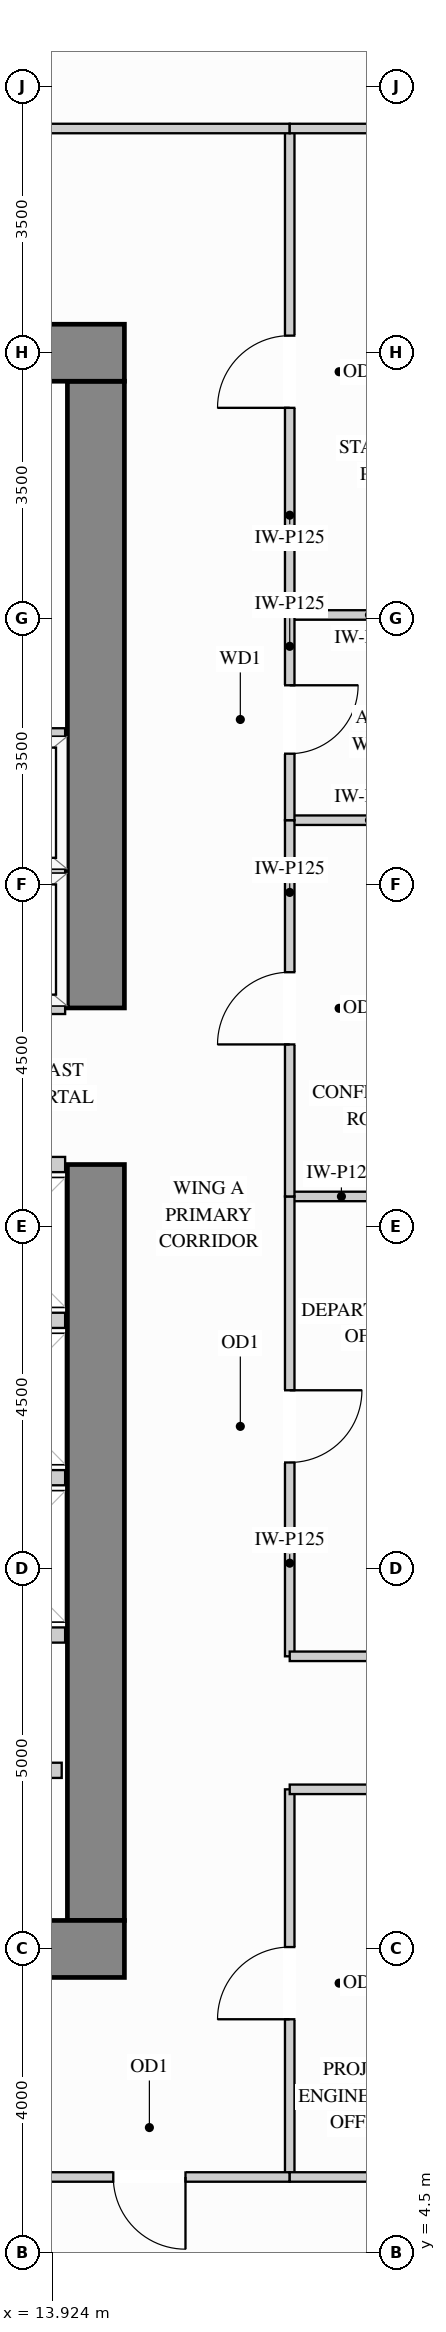
"""IFC4 building model, lengths in metres.
Left out: names, types, materials, properties, quantities, classifications, styles, units other than length and angle.
Written with IfcOpenShell. Run it as: python <this file> out.ifc"""

import sys

from ifc_helpers import new_model, si_unit, direction, frame, frame_2d, origin, place, context, subcontext, project, spatial, rectangle, extrude, source, transform, mapped, element, fill, save


model = new_model("IFC4")
c1 = context("Model", 3, precision=1e-05, world=origin(), true_north=direction((0.0, 1.0)))
c2 = subcontext(c1, "Body", "Model", "MODEL_VIEW")
j1 = project(units=[si_unit("LENGTHUNIT", "METRE"), si_unit("PLANEANGLEUNIT", "RADIAN")], contexts=[c1])
p1 = place(None, origin())
s1 = spatial("IfcSite", under=j1, at=p1, CompositionType="ELEMENT")
p2 = place(p1, origin())
s2 = spatial("IfcBuilding", under=s1, at=p2, CompositionType="ELEMENT")
p3 = place(p2, frame((0.0, 0.0, 106.2)))
s3 = spatial("IfcBuildingStorey", under=s2, at=p3, CompositionType="ELEMENT", Elevation=106.2)
m1 = source(origin(), c2, "Body", "SweptSolid", [
    extrude(rectangle(XDim=9.945, YDim=0.75, at=frame_2d((4.973, 0.0))), origin(), (0.0, 0.0, 1.0), 3.38),
])
p4 = place(p3, frame((14.5, 8.875, 0.0), z_axis=(0.0, 0.0, 1.0), x_axis=(0.0, 1.0, 0.0)))
e1 = element("IfcWall", 1, at=p4, inside=s3, PredefinedType="SHEAR", context=c2, shape_type="MappedRepresentation", body=[
    mapped(m1, transform((0.0, 0.0, 0.0), x_axis=(1.0, 0.0, 0.0), y_axis=(0.0, 1.0, 0.0), z_axis=(0.0, 0.0, 1.0))),
])
m2 = source(origin(), c2, "Body", "SweptSolid", [
    extrude(rectangle(XDim=8.245, YDim=0.75, at=frame_2d((4.123, 0.0))), origin(), (0.0, 0.0, 1.0), 3.38),
])
p5 = place(p3, frame((14.5, 20.88, 0.0), z_axis=(0.0, 0.0, 1.0), x_axis=(0.0, 1.0, 0.0)))
e2 = element("IfcWall", 2, at=p5, inside=s3, PredefinedType="SHEAR", context=c2, shape_type="MappedRepresentation", body=[
    mapped(m2, transform((0.0, 0.0, 0.0), x_axis=(1.0, 0.0, 0.0), y_axis=(0.0, 1.0, 0.0), z_axis=(0.0, 0.0, 1.0))),
])
m3 = source(origin(), c2, "Body", "SweptSolid", [
    extrude(rectangle(XDim=10.75, YDim=0.75, at=frame_2d((5.375, 0.0))), origin(), (0.0, 0.0, 1.0), 3.38),
])
for number, where, z_axis, x_axis in (
    (3, (4.125, 29.5, 0.0), (0.0, 0.0, 1.0), (1.0, 0.0, 0.0)),
    (4, (4.125, 8.5, 0.0), (0.0, 0.0, 1.0), (1.0, 0.0, 0.0)),
):
    element("IfcWall", number, at=place(p3, frame(where, z_axis=z_axis, x_axis=x_axis)), inside=s3, PredefinedType="SHEAR", context=c2, shape_type="MappedRepresentation", body=[
        mapped(m3, transform((0.0, 0.0, 0.0), x_axis=(1.0, 0.0, 0.0), y_axis=(0.0, 1.0, 0.0), z_axis=(0.0, 0.0, 1.0))),
    ])
m4 = source(origin(), c2, "Body", "SweptSolid", [
    extrude(rectangle(XDim=1.36, YDim=0.125, at=frame_2d((0.68, 0.0))), origin(), (0.0, 0.0, 1.0), 3.365),
])
p6 = place(p3, frame((17.05, 18.4, 0.0), z_axis=(0.0, 0.0, 1.0), x_axis=(1.0, 0.0, 0.0)))
e5 = element("IfcWall", 5, at=p6, inside=s3, PredefinedType="PARTITIONING", context=c2, shape_type="MappedRepresentation", body=[
    mapped(m4, transform((0.0, 0.0, 0.0), x_axis=(1.0, 0.0, 0.0), y_axis=(0.0, 1.0, 0.0), z_axis=(0.0, 0.0, 1.0))),
])
m5 = source(origin(), c2, "Body", "SweptSolid", [
    extrude(rectangle(XDim=2.098, YDim=0.125, at=frame_2d((1.049, 0.0))), origin(), (0.0, 0.0, 1.0), 3.365),
])
for number, where, z_axis, x_axis in (
    (6, (17.05, 23.35, 0.0), (0.0, 0.0, 1.0), (1.0, 0.0, 0.0)),
    (7, (17.05, 26.05, 0.0), (0.0, 0.0, 1.0), (1.0, 0.0, 0.0)),
):
    element("IfcWall", number, at=place(p3, frame(where, z_axis=z_axis, x_axis=x_axis)), inside=s3, PredefinedType="PARTITIONING", context=c2, shape_type="MappedRepresentation", body=[
        mapped(m5, transform((0.0, 0.0, 0.0), x_axis=(1.0, 0.0, 0.0), y_axis=(0.0, 1.0, 0.0), z_axis=(0.0, 0.0, 1.0))),
    ])
p7 = place(p3, frame((17.05, 12.35, 0.0), z_axis=(0.0, 0.0, 1.0), x_axis=(0.0, 1.0, 0.0)))
e8 = element("IfcWall", 8, at=p7, inside=s3, PredefinedType="PARTITIONING", context=c2, shape_type="SweptSolid", body=[
    extrude(rectangle(XDim=6.05, YDim=0.125, at=frame_2d((3.025, 0.0))), origin(), (0.0, 0.0, 1.0), 3.365),
])
p8 = place(p7, frame((2.55, 0.0, 0.0)))
e9 = element("IfcOpeningElement", 9, at=p8, cuts=e8, PredefinedType="OPENING", context=c2, shape_type="SweptSolid", body=[
    extrude(rectangle(XDim=0.95, YDim=2.15, at=frame_2d((0.475, 1.075))), frame((0.0, 0.073, 0.0), z_axis=(0.0, -1.0, 0.0), x_axis=(1.0, 0.0, 0.0)), (0.0, 0.0, 1.0), 0.145),
])
p9 = place(p3, frame((17.05, 18.4, 0.0), z_axis=(0.0, 0.0, 1.0), x_axis=(0.0, 1.0, 0.0)))
e10 = element("IfcWall", 10, at=p9, inside=s3, PredefinedType="PARTITIONING", context=c2, shape_type="SweptSolid", body=[
    extrude(rectangle(XDim=4.95, YDim=0.125, at=frame_2d((2.475, 0.0))), origin(), (0.0, 0.0, 1.0), 3.365),
])
p10 = place(p9, frame((2.0, 0.0, 0.0)))
e11 = element("IfcOpeningElement", 11, at=p10, cuts=e10, PredefinedType="OPENING", context=c2, shape_type="SweptSolid", body=[
    extrude(rectangle(XDim=0.95, YDim=2.15, at=frame_2d((0.475, 1.075))), frame((0.0, 0.073, 0.0), z_axis=(0.0, -1.0, 0.0), x_axis=(1.0, 0.0, 0.0)), (0.0, 0.0, 1.0), 0.145),
])
p11 = place(p3, frame((17.05, 26.05, 0.0), z_axis=(0.0, 0.0, 1.0), x_axis=(0.0, 1.0, 0.0)))
e12 = element("IfcWall", 12, at=p11, inside=s3, PredefinedType="PARTITIONING", context=c2, shape_type="SweptSolid", body=[
    extrude(rectangle(XDim=6.4, YDim=0.125, at=frame_2d((3.2, 0.0))), origin(), (0.0, 0.0, 1.0), 3.365),
])
p12 = place(p11, frame((2.725, 0.0, 0.0)))
e13 = element("IfcOpeningElement", 13, at=p12, cuts=e12, PredefinedType="OPENING", context=c2, shape_type="SweptSolid", body=[
    extrude(rectangle(XDim=0.95, YDim=2.15, at=frame_2d((0.475, 1.075))), frame((0.0, 0.073, 0.0), z_axis=(0.0, -1.0, 0.0), x_axis=(1.0, 0.0, 0.0)), (0.0, 0.0, 1.0), 0.145),
])
p13 = place(p3, frame((17.05, 5.5, 0.0), z_axis=(0.0, 0.0, 1.0), x_axis=(0.0, 1.0, 0.0)))
e14 = element("IfcWall", 14, at=p13, inside=s3, PredefinedType="PARTITIONING", context=c2, shape_type="SweptSolid", body=[
    extrude(rectangle(XDim=5.1, YDim=0.125, at=frame_2d((2.55, 0.0))), origin(), (0.0, 0.0, 1.0), 3.365),
])
p14 = place(p13, frame((2.075, 0.0, 0.0)))
e15 = element("IfcOpeningElement", 15, at=p14, cuts=e14, PredefinedType="OPENING", context=c2, shape_type="SweptSolid", body=[
    extrude(rectangle(XDim=0.95, YDim=2.15, at=frame_2d((0.475, 1.075))), frame((0.0, 0.073, 0.0), z_axis=(0.0, -1.0, 0.0), x_axis=(1.0, 0.0, 0.0)), (0.0, 0.0, 1.0), 0.145),
])
p15 = place(p3, frame((17.05, 23.35, 0.0), z_axis=(0.0, 0.0, 1.0), x_axis=(0.0, 1.0, 0.0)))
e16 = element("IfcWall", 16, at=p15, inside=s3, PredefinedType="PARTITIONING", context=c2, shape_type="SweptSolid", body=[
    extrude(rectangle(XDim=2.7, YDim=0.125, at=frame_2d((1.35, 0.0))), origin(), (0.0, 0.0, 1.0), 3.365),
])
p16 = place(p15, frame((0.875, 0.0, 0.0)))
e17 = element("IfcOpeningElement", 17, at=p16, cuts=e16, PredefinedType="OPENING", context=c2, shape_type="SweptSolid", body=[
    extrude(rectangle(XDim=0.9, YDim=2.15, at=frame_2d((0.45, 1.075))), frame((0.0, 0.073, 0.0), z_axis=(0.0, -1.0, 0.0), x_axis=(1.0, 0.0, 0.0)), (0.0, 0.0, 1.0), 0.145),
])
p17 = place(p3, frame((9.039, 32.45, 0.0), z_axis=(0.0, 0.0, 1.0), x_axis=(1.0, 0.0, 0.0)))
e18 = element("IfcWall", 18, at=p17, inside=s3, PredefinedType="PARTITIONING", context=c2, shape_type="SweptSolid", body=[
    extrude(rectangle(XDim=8.011, YDim=0.125, at=frame_2d((4.005, 0.0))), origin(), (0.0, 0.0, 1.0), 3.365),
])
p18 = place(p17, frame((3.531, 0.0, 0.0)))
e19 = element("IfcOpeningElement", 19, at=p18, cuts=e18, PredefinedType="OPENING", context=c2, shape_type="SweptSolid", body=[
    extrude(rectangle(XDim=0.95, YDim=2.15, at=frame_2d((0.475, 1.075))), frame((0.0, 0.073, 0.0), z_axis=(0.0, -1.0, 0.0), x_axis=(1.0, 0.0, 0.0)), (0.0, 0.0, 1.0), 0.145),
])
p19 = place(p3, frame((17.05, 32.45, 0.0), z_axis=(0.0, 0.0, 1.0), x_axis=(1.0, 0.0, 0.0)))
e20 = element("IfcWall", 20, at=p19, inside=s3, PredefinedType="PARTITIONING", context=c2, shape_type="MappedRepresentation", body=[
    mapped(m5, transform((0.0, 0.0, 0.0), x_axis=(1.0, 0.0, 0.0), y_axis=(0.0, 1.0, 0.0), z_axis=(0.0, 0.0, 1.0))),
])
m6 = source(origin(), c2, "Body", "SweptSolid", [
    extrude(rectangle(XDim=2.45, YDim=0.125, at=frame_2d((1.225, 0.0))), origin(), (0.0, 0.0, 1.0), 3.365),
])
for number, where, z_axis, x_axis in (
    (21, (17.05, 12.35, 0.0), (0.0, 0.0, 1.0), (1.0, 0.0, 0.0)),
    (22, (17.05, 10.6, 0.0), (0.0, 0.0, 1.0), (1.0, 0.0, 0.0)),
):
    element("IfcWall", number, at=place(p3, frame(where, z_axis=z_axis, x_axis=x_axis)), inside=s3, PredefinedType="PARTITIONING", context=c2, shape_type="MappedRepresentation", body=[
        mapped(m6, transform((0.0, 0.0, 0.0), x_axis=(1.0, 0.0, 0.0), y_axis=(0.0, 1.0, 0.0), z_axis=(0.0, 0.0, 1.0))),
    ])
p20 = place(p3, frame((13.357, 5.5, 0.0), z_axis=(0.0, 0.0, 1.0), x_axis=(1.0, 0.0, 0.0)))
e23 = element("IfcWall", 23, at=p20, inside=s3, PredefinedType="PARTITIONING", context=c2, shape_type="SweptSolid", body=[
    extrude(rectangle(XDim=3.693, YDim=0.125, at=frame_2d((1.847, 0.0))), origin(), (0.0, 0.0, 1.0), 3.365),
])
p21 = place(p20, frame((1.372, 0.0, 0.0)))
e24 = element("IfcOpeningElement", 24, at=p21, cuts=e23, PredefinedType="OPENING", context=c2, shape_type="SweptSolid", body=[
    extrude(rectangle(XDim=0.95, YDim=2.15, at=frame_2d((0.475, 1.075))), frame((0.0, 0.073, 0.0), z_axis=(0.0, -1.0, 0.0), x_axis=(1.0, 0.0, 0.0)), (0.0, 0.0, 1.0), 0.145),
])
p22 = place(p3, frame((17.05, 5.5, 0.0), z_axis=(0.0, 0.0, 1.0), x_axis=(1.0, 0.0, 0.0)))
e25 = element("IfcWall", 25, at=p22, inside=s3, PredefinedType="PARTITIONING", context=c2, shape_type="MappedRepresentation", body=[
    mapped(m5, transform((0.0, 0.0, 0.0), x_axis=(1.0, 0.0, 0.0), y_axis=(0.0, 1.0, 0.0), z_axis=(0.0, 0.0, 1.0))),
])
m7 = source(origin(), c2, "Body", "SweptSolid", [
    extrude(rectangle(XDim=1.63, YDim=0.2, at=frame_2d((0.815, 0.0))), origin(), (0.0, 0.0, 1.0), 3.365),
])
p23 = place(p3, frame((12.42, 10.85, 0.0), z_axis=(0.0, 0.0, 1.0), x_axis=(1.0, 0.0, 0.0)))
e26 = element("IfcWall", 26, at=p23, inside=s3, PredefinedType="PARTITIONING", context=c2, shape_type="MappedRepresentation", body=[
    mapped(m7, transform((0.0, 0.0, 0.0), x_axis=(1.0, 0.0, 0.0), y_axis=(0.0, 1.0, 0.0), z_axis=(0.0, 0.0, 1.0))),
])
m8 = source(origin(), c2, "Body", "SweptSolid", [
    extrude(rectangle(XDim=2.265, YDim=0.2, at=frame_2d((1.132, 0.0))), origin(), (0.0, 0.0, 1.0), 3.365),
])
for number, where, z_axis, x_axis in (
    (27, (11.83, 22.66, 0.0), (0.0, 0.0, 1.0), (1.0, 0.0, 0.0)),
    (28, (11.83, 20.9, 0.0), (0.0, 0.0, 1.0), (1.0, 0.0, 0.0)),
    (29, (11.83, 24.46, 0.0), (0.0, 0.0, 1.0), (1.0, 0.0, 0.0)),
):
    element("IfcWall", number, at=place(p3, frame(where, z_axis=z_axis, x_axis=x_axis)), inside=s3, PredefinedType="PARTITIONING", context=c2, shape_type="MappedRepresentation", body=[
        mapped(m8, transform((0.0, 0.0, 0.0), x_axis=(1.0, 0.0, 0.0), y_axis=(0.0, 1.0, 0.0), z_axis=(0.0, 0.0, 1.0))),
    ])
m9 = source(origin(), c2, "Body", "SweptSolid", [
    extrude(rectangle(XDim=1.865, YDim=0.2, at=frame_2d((0.933, 0.0))), origin(), (0.0, 0.0, 1.0), 3.365),
])
for number, where, z_axis, x_axis in (
    (30, (12.23, 14.7, 0.0), (0.0, 0.0, 1.0), (1.0, 0.0, 0.0)),
    (31, (12.23, 12.63, 0.0), (0.0, 0.0, 1.0), (1.0, 0.0, 0.0)),
    (32, (12.23, 16.77, 0.0), (0.0, 0.0, 1.0), (1.0, 0.0, 0.0)),
    (33, (12.23, 18.82, 0.0), (0.0, 0.0, 1.0), (1.0, 0.0, 0.0)),
):
    element("IfcWall", number, at=place(p3, frame(where, z_axis=z_axis, x_axis=x_axis)), inside=s3, PredefinedType="PARTITIONING", context=c2, shape_type="MappedRepresentation", body=[
        mapped(m9, transform((0.0, 0.0, 0.0), x_axis=(1.0, 0.0, 0.0), y_axis=(0.0, 1.0, 0.0), z_axis=(0.0, 0.0, 1.0))),
    ])
m10 = source(origin(), c2, "Body", "SweptSolid", [
    extrude(rectangle(XDim=0.95, YDim=2.15, at=frame_2d((0.475, 1.075))), frame((0.0, 0.025, 0.0), z_axis=(0.0, -1.0, 0.0), x_axis=(1.0, 0.0, 0.0)), (0.0, 0.0, 1.0), 0.05),
])
p24 = place(p14, origin())
e34 = element("IfcDoor", 34, at=p24, inside=s3, OperationType="SINGLE_SWING_LEFT", PredefinedType="DOOR", context=c2, shape_type="MappedRepresentation", body=[
    mapped(m10, transform((0.0, 0.0, 0.0), x_axis=(1.0, 0.0, 0.0), y_axis=(0.0, 1.0, 0.0), z_axis=(0.0, 0.0, 1.0))),
])
fill(e15, e34)
p25 = place(p8, origin())
e35 = element("IfcDoor", 35, at=p25, inside=s3, OperationType="SINGLE_SWING_RIGHT", PredefinedType="DOOR", context=c2, shape_type="MappedRepresentation", body=[
    mapped(m10, transform((0.0, 0.0, 0.0), x_axis=(1.0, 0.0, 0.0), y_axis=(0.0, 1.0, 0.0), z_axis=(0.0, 0.0, 1.0))),
])
fill(e9, e35)
p26 = place(p10, origin())
e36 = element("IfcDoor", 36, at=p26, inside=s3, OperationType="SINGLE_SWING_LEFT", PredefinedType="DOOR", context=c2, shape_type="MappedRepresentation", body=[
    mapped(m10, transform((0.0, 0.0, 0.0), x_axis=(1.0, 0.0, 0.0), y_axis=(0.0, 1.0, 0.0), z_axis=(0.0, 0.0, 1.0))),
])
fill(e11, e36)
p27 = place(p12, origin())
e37 = element("IfcDoor", 37, at=p27, inside=s3, OperationType="SINGLE_SWING_LEFT", PredefinedType="DOOR", context=c2, shape_type="MappedRepresentation", body=[
    mapped(m10, transform((0.0, 0.0, 0.0), x_axis=(1.0, 0.0, 0.0), y_axis=(0.0, 1.0, 0.0), z_axis=(0.0, 0.0, 1.0))),
])
fill(e13, e37)
p28 = place(p21, origin())
e38 = element("IfcDoor", 38, at=p28, inside=s3, OperationType="SINGLE_SWING_RIGHT", PredefinedType="DOOR", context=c2, shape_type="MappedRepresentation", body=[
    mapped(m10, transform((0.0, 0.0, 0.0), x_axis=(1.0, 0.0, 0.0), y_axis=(0.0, 1.0, 0.0), z_axis=(0.0, 0.0, 1.0))),
])
fill(e24, e38)
m11 = source(origin(), c2, "Body", "SweptSolid", [
    extrude(rectangle(XDim=0.9, YDim=2.15, at=frame_2d((0.45, 1.075))), frame((0.0, 0.025, 0.0), z_axis=(0.0, -1.0, 0.0), x_axis=(1.0, 0.0, 0.0)), (0.0, 0.0, 1.0), 0.05),
])
p29 = place(p16, origin())
e39 = element("IfcDoor", 39, at=p29, inside=s3, OperationType="SINGLE_SWING_RIGHT", PredefinedType="DOOR", context=c2, shape_type="MappedRepresentation", body=[
    mapped(m11, transform((0.0, 0.0, 0.0), x_axis=(1.0, 0.0, 0.0), y_axis=(0.0, 1.0, 0.0), z_axis=(0.0, 0.0, 1.0))),
])
fill(e17, e39)
save(model, sys.argv[1])
